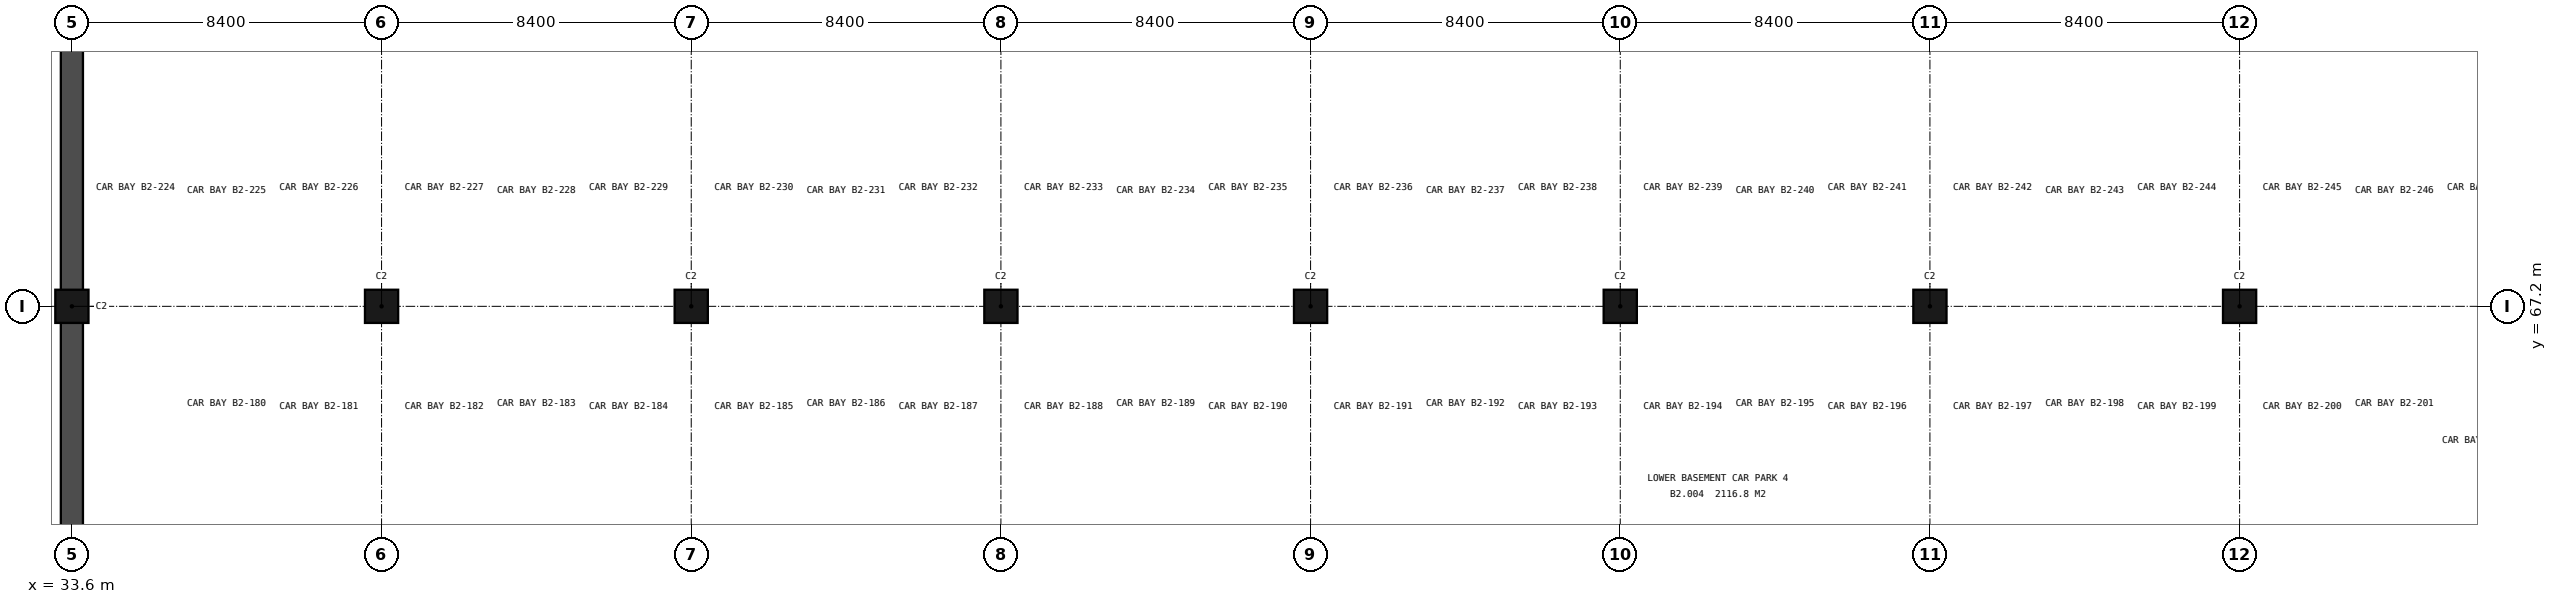
"""IFC4 building model, lengths in metres.
Left out: names, types, materials, properties, quantities, classifications, styles, units other than length and angle.
Written with IfcOpenShell. Run it as: python <this file> out.ifc"""

import sys

from ifc_helpers import new_model, si_unit, direction, frame, frame_2d, origin, origin_2d, place, context, subcontext, project, spatial, rectangle, extrude, element, save


model = new_model("IFC4")
c1 = context("Model", 3, precision=1e-05, world=origin(), true_north=direction((0.0, 1.0)))
c2 = subcontext(c1, "Body", "Model", "MODEL_VIEW")
j1 = project(units=[si_unit("LENGTHUNIT", "METRE"), si_unit("PLANEANGLEUNIT", "RADIAN")], contexts=[c1])
p1 = place(None, origin())
s1 = spatial("IfcSite", under=j1, at=p1, CompositionType="ELEMENT")
p2 = place(p1, origin())
s2 = spatial("IfcBuilding", under=s1, at=p2, CompositionType="ELEMENT")
p3 = place(p2, frame((0.0, 0.0, -9.6)))
s3 = spatial("IfcBuildingStorey", under=s2, at=p3, CompositionType="ELEMENT", Elevation=-9.6)
for number, where, z_axis, x_axis in (
    (1, (33.6, 67.2, -0.25), (0.0, 0.0, 1.0), (1.0, 0.0, 0.0)),
    (2, (42.0, 67.2, -0.25), (0.0, 0.0, 1.0), (1.0, 0.0, 0.0)),
    (3, (50.4, 67.2, -0.25), (0.0, 0.0, 1.0), (1.0, 0.0, 0.0)),
    (4, (58.8, 67.2, -0.25), (0.0, 0.0, 1.0), (1.0, 0.0, 0.0)),
    (5, (67.2, 67.2, -0.25), (0.0, 0.0, 1.0), (1.0, 0.0, 0.0)),
    (6, (75.6, 67.2, -0.25), (0.0, 0.0, 1.0), (1.0, 0.0, 0.0)),
    (7, (84.0, 67.2, -0.25), (0.0, 0.0, 1.0), (1.0, 0.0, 0.0)),
    (8, (92.4, 67.2, -0.25), (0.0, 0.0, 1.0), (1.0, 0.0, 0.0)),
):
    element("IfcColumn", number, at=place(p3, frame(where, z_axis=z_axis, x_axis=x_axis)), inside=s3, PredefinedType="COLUMN", context=c2, shape_type="SweptSolid", body=[
        extrude(rectangle(XDim=0.9, YDim=0.9, at=origin_2d()), origin(), (0.0, 0.0, 1.0), 4.75),
    ])
p4 = place(p3, frame((33.6, 84.3, -0.25), z_axis=(0.0, 0.0, 1.0), x_axis=(0.0, -1.0, 0.0)))
e9 = element("IfcWall", 9, at=p4, inside=s3, PredefinedType="SOLIDWALL", context=c2, shape_type="SweptSolid", body=[
    extrude(rectangle(XDim=34.2, YDim=0.6, at=frame_2d((17.1, 0.0))), origin(), (0.0, 0.0, 1.0), 4.75),
])
save(model, sys.argv[1])
